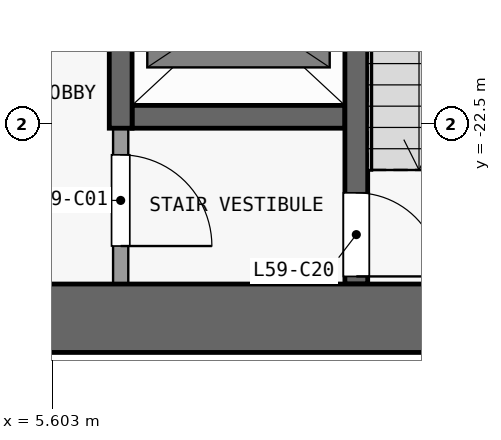
"""IFC4 building model, lengths in metres.
Left out: names, types, materials, properties, quantities, classifications, styles, units other than length and angle.
Written with IfcOpenShell. Run it as: python <this file> out.ifc"""

import sys

from ifc_helpers import new_model, si_unit, direction, frame, frame_2d, origin, place, context, subcontext, project, spatial, rectangle, extrude, element, fill, save


model = new_model("IFC4")
c1 = context("Model", 3, precision=1e-05, world=origin(), true_north=direction((0.0, 1.0)))
c2 = subcontext(c1, "Body", "Model", "MODEL_VIEW")
j1 = project(units=[si_unit("LENGTHUNIT", "METRE"), si_unit("PLANEANGLEUNIT", "RADIAN")], contexts=[c1])
p1 = place(None, origin())
s1 = spatial("IfcSite", under=j1, at=p1, CompositionType="ELEMENT")
p2 = place(p1, origin())
s2 = spatial("IfcBuilding", under=s1, at=p2, CompositionType="ELEMENT")
p3 = place(p2, frame((0.0, 0.0, 233.9)))
s3 = spatial("IfcBuildingStorey", under=s2, at=p3, CompositionType="ELEMENT", Elevation=233.9)
p4 = place(p3, frame((-13.2, -25.05, 0.0), z_axis=(0.0, 0.0, 1.0), x_axis=(1.0, 0.0, 0.0)))
e1 = element("IfcWall", 1, at=p4, inside=s3, PredefinedType="SHEAR", context=c2, shape_type="SweptSolid", body=[
    extrude(rectangle(XDim=26.4, YDim=0.9, at=frame_2d((13.2, 0.0))), origin(), (0.0, 0.0, 1.0), 3.3),
])
p5 = place(p3, frame((6.65, -22.4, 0.0), z_axis=(0.0, 0.0, 1.0), x_axis=(1.0, 0.0, 0.0)))
e2 = element("IfcWall", 2, at=p5, inside=s3, PredefinedType="SHEAR", context=c2, shape_type="SweptSolid", body=[
    extrude(rectangle(XDim=2.8, YDim=0.3, at=frame_2d((1.4, 0.0))), origin(), (0.0, 0.0, 1.0), 3.3),
])
p6 = place(p3, frame((6.5, -22.55, 0.0), z_axis=(0.0, 0.0, 1.0), x_axis=(0.0, -1.0, 0.0)))
e3 = element("IfcWall", 3, at=p6, inside=s3, PredefinedType="PARTITIONING", context=c2, shape_type="SweptSolid", body=[
    extrude(rectangle(XDim=2.05, YDim=0.2, at=frame_2d((1.025, 0.0))), origin(), (0.0, 0.0, 1.0), 3.3),
])
p7 = place(p6, frame((0.35, 0.0, 0.0)))
e4 = element("IfcOpeningElement", 4, at=p7, cuts=e3, PredefinedType="OPENING", context=c2, shape_type="SweptSolid", body=[
    extrude(rectangle(XDim=1.2, YDim=2.1, at=frame_2d((0.6, 1.05))), frame((0.0, 0.11, 0.0), z_axis=(0.0, -1.0, 0.0), x_axis=(1.0, 0.0, 0.0)), (0.0, 0.0, 1.0), 0.22),
])
p8 = place(p3, frame((6.5, -22.55, 0.0), z_axis=(0.0, 0.0, 1.0), x_axis=(0.0, 1.0, 0.0)))
e5 = element("IfcWall", 5, at=p8, inside=s3, PredefinedType="SHEAR", context=c2, shape_type="SweptSolid", body=[
    extrude(rectangle(XDim=14.05, YDim=0.3, at=frame_2d((7.025, 0.0))), origin(), (0.0, 0.0, 1.0), 3.3),
])
p9 = place(p8, frame((1.05, 0.0, 0.0)))
e6 = element("IfcOpeningElement", 6, at=p9, cuts=e5, PredefinedType="OPENING", context=c2, shape_type="SweptSolid", body=[
    extrude(rectangle(XDim=1.1, YDim=2.1, at=frame_2d((0.55, 1.05))), frame((0.0, 0.16, 0.0), z_axis=(0.0, -1.0, 0.0), x_axis=(1.0, 0.0, 0.0)), (0.0, 0.0, 1.0), 0.32),
])
p10 = place(p8, frame((3.875, 0.0, 0.0)))
e7 = element("IfcOpeningElement", 7, at=p10, cuts=e5, PredefinedType="OPENING", context=c2, shape_type="SweptSolid", body=[
    extrude(rectangle(XDim=1.1, YDim=2.1, at=frame_2d((0.55, 1.05))), frame((0.0, 0.16, 0.0), z_axis=(0.0, -1.0, 0.0), x_axis=(1.0, 0.0, 0.0)), (0.0, 0.0, 1.0), 0.32),
])
p11 = place(p8, frame((6.625, 0.0, 0.0)))
e8 = element("IfcOpeningElement", 8, at=p11, cuts=e5, PredefinedType="OPENING", context=c2, shape_type="SweptSolid", body=[
    extrude(rectangle(XDim=1.1, YDim=2.1, at=frame_2d((0.55, 1.05))), frame((0.0, 0.16, 0.0), z_axis=(0.0, -1.0, 0.0), x_axis=(1.0, 0.0, 0.0)), (0.0, 0.0, 1.0), 0.32),
])
p12 = place(p8, frame((9.375, 0.0, 0.0)))
e9 = element("IfcOpeningElement", 9, at=p12, cuts=e5, PredefinedType="OPENING", context=c2, shape_type="SweptSolid", body=[
    extrude(rectangle(XDim=1.1, YDim=2.1, at=frame_2d((0.55, 1.05))), frame((0.0, 0.16, 0.0), z_axis=(0.0, -1.0, 0.0), x_axis=(1.0, 0.0, 0.0)), (0.0, 0.0, 1.0), 0.32),
])
p13 = place(p8, frame((12.125, 0.0, 0.0)))
e10 = element("IfcOpeningElement", 10, at=p13, cuts=e5, PredefinedType="OPENING", context=c2, shape_type="SweptSolid", body=[
    extrude(rectangle(XDim=1.1, YDim=2.1, at=frame_2d((0.55, 1.05))), frame((0.0, 0.16, 0.0), z_axis=(0.0, -1.0, 0.0), x_axis=(1.0, 0.0, 0.0)), (0.0, 0.0, 1.0), 0.32),
])
p14 = place(p3, frame((9.6, -16.9, 0.0), z_axis=(0.0, 0.0, 1.0), x_axis=(0.0, -1.0, 0.0)))
e11 = element("IfcWall", 11, at=p14, inside=s3, PredefinedType="SHEAR", context=c2, shape_type="SweptSolid", body=[
    extrude(rectangle(XDim=7.7, YDim=0.3, at=frame_2d((3.85, 0.0))), origin(), (0.0, 0.0, 1.0), 3.3),
])
p15 = place(p14, frame((6.5, 0.0, 0.0)))
e12 = element("IfcOpeningElement", 12, at=p15, cuts=e11, PredefinedType="OPENING", context=c2, shape_type="SweptSolid", body=[
    extrude(rectangle(XDim=1.1, YDim=2.1, at=frame_2d((0.55, 1.05))), frame((0.0, 0.16, 0.0), z_axis=(0.0, -1.0, 0.0), x_axis=(1.0, 0.0, 0.0)), (0.0, 0.0, 1.0), 0.32),
])
p16 = place(p7, origin())
e13 = element("IfcDoor", 13, at=p16, inside=s3, OperationType="SINGLE_SWING_RIGHT", PredefinedType="DOOR", context=c2, shape_type="SweptSolid", body=[
    extrude(rectangle(XDim=1.2, YDim=2.1, at=frame_2d((0.6, 1.05))), frame((0.0, 0.025, 0.0), z_axis=(0.0, -1.0, 0.0), x_axis=(1.0, 0.0, 0.0)), (0.0, 0.0, 1.0), 0.05),
])
fill(e4, e13)
p17 = place(p15, origin())
e14 = element("IfcDoor", 14, at=p17, inside=s3, OperationType="SINGLE_SWING_RIGHT", PredefinedType="DOOR", context=c2, shape_type="SweptSolid", body=[
    extrude(rectangle(XDim=1.1, YDim=2.1, at=frame_2d((0.55, 1.05))), frame((0.0, 0.025, 0.0), z_axis=(0.0, -1.0, 0.0), x_axis=(1.0, 0.0, 0.0)), (0.0, 0.0, 1.0), 0.05),
])
fill(e12, e14)
save(model, sys.argv[1])
